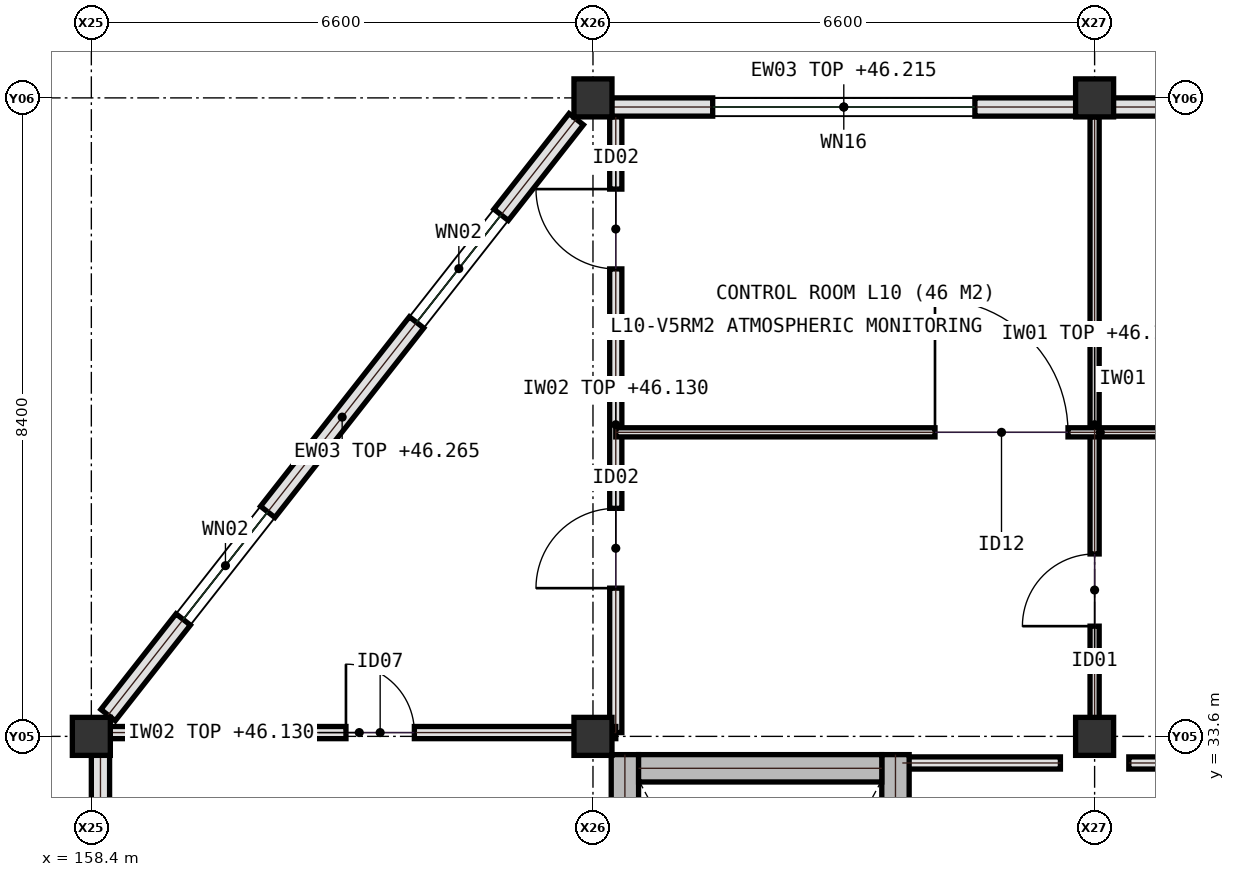
"""IFC4 building model, lengths in metres.
Left out: names, types, materials, properties, quantities, classifications, styles, units other than length and angle.
Written with IfcOpenShell. Run it as: python <this file> out.ifc"""

import sys

from ifc_helpers import new_model, si_unit, direction, frame, frame_2d, origin, origin_2d, place, context, subcontext, project, spatial, rectangle, extrude, element, fill, save


model = new_model("IFC4")
c1 = context("Model", 3, precision=1e-05, world=origin(), true_north=direction((0.0, 1.0)))
c2 = subcontext(c1, "Body", "Model", "MODEL_VIEW")
j1 = project(units=[si_unit("LENGTHUNIT", "METRE"), si_unit("PLANEANGLEUNIT", "RADIAN")], contexts=[c1])
p1 = place(None, origin())
s1 = spatial("IfcSite", under=j1, at=p1, CompositionType="ELEMENT")
p2 = place(p1, origin())
s2 = spatial("IfcBuilding", under=s1, at=p2, CompositionType="ELEMENT")
p3 = place(p2, frame((0.0, 0.0, 43.2)))
s3 = spatial("IfcBuildingStorey", under=s2, at=p3, CompositionType="ELEMENT", Elevation=43.2)
for number, where, z_axis, x_axis in (
    (1, (158.4, 33.6, 0.0), (0.0, 0.0, 1.0), (1.0, 0.0, 0.0)),
    (2, (165.0, 33.6, 0.0), (0.0, 0.0, 1.0), (1.0, 0.0, 0.0)),
    (3, (165.0, 42.0, 0.0), (0.0, 0.0, 1.0), (1.0, 0.0, 0.0)),
    (4, (171.6, 33.6, 0.0), (0.0, 0.0, 1.0), (1.0, 0.0, 0.0)),
    (5, (171.6, 42.0, 0.0), (0.0, 0.0, 1.0), (1.0, 0.0, 0.0)),
):
    element("IfcColumn", number, at=place(p3, frame(where, z_axis=z_axis, x_axis=x_axis)), inside=s3, PredefinedType="COLUMN", context=c2, shape_type="SweptSolid", body=[
        extrude(rectangle(XDim=0.5, YDim=0.5, at=origin_2d()), origin(), (0.0, 0.0, 1.0), 3.9),
    ])
p4 = place(p3, frame((165.3, 33.65, 0.0), z_axis=(0.0, 0.0, 1.0), x_axis=(0.0, 1.0, 0.0)))
e6 = element("IfcWall", 6, at=p4, inside=s3, PredefinedType="PARTITIONING", context=c2, shape_type="SweptSolid", body=[
    extrude(rectangle(XDim=8.1, YDim=0.16, at=frame_2d((4.05, 0.0))), origin(), (0.0, 0.0, 1.0), 2.93),
])
p5 = place(p4, frame((1.9, 0.0, 0.0)))
e7 = element("IfcOpeningElement", 7, at=p5, cuts=e6, PredefinedType="OPENING", context=c2, shape_type="SweptSolid", body=[
    extrude(rectangle(XDim=1.05, YDim=2.15, at=frame_2d((0.525, 1.075))), frame((0.0, 0.09, 0.0), z_axis=(0.0, -1.0, 0.0), x_axis=(1.0, 0.0, 0.0)), (0.0, 0.0, 1.0), 0.18),
])
p6 = place(p4, frame((6.1, 0.0, 0.0)))
e8 = element("IfcOpeningElement", 8, at=p6, cuts=e6, PredefinedType="OPENING", context=c2, shape_type="SweptSolid", body=[
    extrude(rectangle(XDim=1.05, YDim=2.15, at=frame_2d((0.525, 1.075))), frame((0.0, 0.09, 0.0), z_axis=(0.0, -1.0, 0.0), x_axis=(1.0, 0.0, 0.0)), (0.0, 0.0, 1.0), 0.18),
])
p7 = place(p3, frame((158.55, 33.65, 0.0), z_axis=(0.0, 0.0, 1.0), x_axis=(1.0, 0.0, 0.0)))
e9 = element("IfcWall", 9, at=p7, inside=s3, PredefinedType="PARTITIONING", context=c2, shape_type="SweptSolid", body=[
    extrude(rectangle(XDim=6.75, YDim=0.16, at=frame_2d((3.375, 0.0))), origin(), (0.0, 0.0, 1.0), 2.93),
])
p8 = place(p7, frame((3.2, 0.0, 0.0)))
e10 = element("IfcOpeningElement", 10, at=p8, cuts=e9, PredefinedType="OPENING", context=c2, shape_type="SweptSolid", body=[
    extrude(rectangle(XDim=0.9, YDim=2.1, at=frame_2d((0.45, 1.05))), frame((0.0, 0.09, 0.0), z_axis=(0.0, -1.0, 0.0), x_axis=(1.0, 0.0, 0.0)), (0.0, 0.0, 1.0), 0.18),
])
p9 = place(p3, frame((171.6, 33.65, 0.0), z_axis=(0.0, 0.0, 1.0), x_axis=(0.0, 1.0, 0.0)))
e11 = element("IfcWall", 11, at=p9, inside=s3, PredefinedType="PARTITIONING", context=c2, shape_type="SweptSolid", body=[
    extrude(rectangle(XDim=8.1, YDim=0.12, at=frame_2d((4.05, 0.0))), origin(), (0.0, 0.0, 1.0), 2.93),
])
p10 = place(p9, frame((1.4, 0.0, 0.0)))
e12 = element("IfcOpeningElement", 12, at=p10, cuts=e11, PredefinedType="OPENING", context=c2, shape_type="SweptSolid", body=[
    extrude(rectangle(XDim=0.95, YDim=2.15, at=frame_2d((0.475, 1.075))), frame((0.0, 0.07, 0.0), z_axis=(0.0, -1.0, 0.0), x_axis=(1.0, 0.0, 0.0)), (0.0, 0.0, 1.0), 0.14),
])
p11 = place(p3, frame((165.3, 37.6, 0.0), z_axis=(0.0, 0.0, 1.0), x_axis=(1.0, 0.0, 0.0)))
e13 = element("IfcWall", 13, at=p11, inside=s3, PredefinedType="PARTITIONING", context=c2, shape_type="SweptSolid", body=[
    extrude(rectangle(XDim=12.75, YDim=0.12, at=frame_2d((6.375, 0.0))), origin(), (0.0, 0.0, 1.0), 2.93),
])
p12 = place(p11, frame((4.2, 0.0, 0.0)))
e14 = element("IfcOpeningElement", 14, at=p12, cuts=e13, PredefinedType="OPENING", context=c2, shape_type="SweptSolid", body=[
    extrude(rectangle(XDim=1.75, YDim=2.3, at=frame_2d((0.875, 1.15))), frame((0.0, 0.07, 0.0), z_axis=(0.0, -1.0, 0.0), x_axis=(1.0, 0.0, 0.0)), (0.0, 0.0, 1.0), 0.14),
])
p13 = place(p11, frame((9.2, 0.0, 0.0)))
e15 = element("IfcOpeningElement", 15, at=p13, cuts=e13, PredefinedType="OPENING", context=c2, shape_type="SweptSolid", body=[
    extrude(rectangle(XDim=1.75, YDim=2.3, at=frame_2d((0.875, 1.15))), frame((0.0, 0.07, 0.0), z_axis=(0.0, -1.0, 0.0), x_axis=(1.0, 0.0, 0.0)), (0.0, 0.0, 1.0), 0.14),
])
p14 = place(p3, frame((169.07, 33.25, 0.0), z_axis=(0.0, 0.0, 1.0), x_axis=(1.0, 0.0, 0.0)))
e16 = element("IfcWall", 16, at=p14, inside=s3, PredefinedType="PARTITIONING", context=c2, shape_type="SweptSolid", body=[
    extrude(rectangle(XDim=2.08, YDim=0.16, at=frame_2d((1.04, 0.0))), origin(), (0.0, 0.0, 1.0), 2.93),
])
p15 = place(p3, frame((172.05, 33.25, 0.0), z_axis=(0.0, 0.0, 1.0), x_axis=(1.0, 0.0, 0.0)))
e17 = element("IfcWall", 17, at=p15, inside=s3, PredefinedType="PARTITIONING", context=c2, shape_type="SweptSolid", body=[
    extrude(rectangle(XDim=5.95, YDim=0.16, at=frame_2d((2.975, 0.0))), origin(), (0.0, 0.0, 1.0), 2.93),
])
p16 = place(p3, frame((158.52, 33.355, 0.0), z_axis=(0.0, 0.0, 1.0), x_axis=(0.0, -1.0, 0.0)))
e18 = element("IfcWall", 18, at=p16, inside=s3, PredefinedType="SOLIDWALL", context=c2, shape_type="SweptSolid", body=[
    extrude(rectangle(XDim=7.91, YDim=0.24, at=frame_2d((3.955, 0.0))), origin(), (0.0, 0.0, 1.0), 3.115),
])
p17 = place(p16, frame((3.305, 0.0, 0.95)))
e19 = element("IfcOpeningElement", 19, at=p17, cuts=e18, PredefinedType="OPENING", context=c2, shape_type="SweptSolid", body=[
    extrude(rectangle(XDim=1.3, YDim=1.75, at=frame_2d((0.65, 0.875))), frame((0.0, 0.13, 0.0), z_axis=(0.0, -1.0, 0.0), x_axis=(1.0, 0.0, 0.0)), (0.0, 0.0, 1.0), 0.26),
])
p18 = place(p3, frame((171.355, 41.88, 0.0), z_axis=(0.0, 0.0, 1.0), x_axis=(-1.0, 0.0, 0.0)))
e20 = element("IfcWall", 20, at=p18, inside=s3, PredefinedType="SOLIDWALL", context=c2, shape_type="SweptSolid", body=[
    extrude(rectangle(XDim=6.11, YDim=0.24, at=frame_2d((3.055, 0.0))), origin(), (0.0, 0.0, 1.0), 3.015),
])
p19 = place(p18, frame((1.33, 0.0, 0.95)))
e21 = element("IfcOpeningElement", 21, at=p19, cuts=e20, PredefinedType="OPENING", context=c2, shape_type="SweptSolid", body=[
    extrude(rectangle(XDim=3.45, YDim=1.7, at=frame_2d((1.725, 0.85))), frame((0.0, 0.13, 0.0), z_axis=(0.0, -1.0, 0.0), x_axis=(1.0, 0.0, 0.0)), (0.0, 0.0, 1.0), 0.26),
])
p20 = place(p3, frame((177.955, 41.88, 0.0), z_axis=(0.0, 0.0, 1.0), x_axis=(-1.0, 0.0, 0.0)))
e22 = element("IfcWall", 22, at=p20, inside=s3, PredefinedType="SOLIDWALL", context=c2, shape_type="SweptSolid", body=[
    extrude(rectangle(XDim=6.11, YDim=0.24, at=frame_2d((3.055, 0.0))), origin(), (0.0, 0.0, 1.0), 3.015),
])
p21 = place(p20, frame((2.605, 0.0, 0.95)))
e23 = element("IfcOpeningElement", 23, at=p21, cuts=e22, PredefinedType="OPENING", context=c2, shape_type="SweptSolid", body=[
    extrude(rectangle(XDim=0.9, YDim=1.4, at=frame_2d((0.45, 0.7))), frame((0.0, 0.13, 0.0), z_axis=(0.0, -1.0, 0.0), x_axis=(1.0, 0.0, 0.0)), (0.0, 0.0, 1.0), 0.26),
])
p22 = place(p3, frame((158.62, 33.88, 0.0), z_axis=(0.0, 0.0, 1.0), x_axis=(0.617811819191, 0.786325985878, 0.0)))
e24 = element("IfcWall", 24, at=p22, inside=s3, PredefinedType="SOLIDWALL", context=c2, shape_type="SweptSolid", body=[
    extrude(rectangle(XDim=9.97, YDim=0.24, at=frame_2d((4.985, 0.0))), origin(), (0.0, 0.0, 1.0), 3.065),
])
p23 = place(p22, frame((1.6, 0.0, 0.95)))
e25 = element("IfcOpeningElement", 25, at=p23, cuts=e24, PredefinedType="OPENING", context=c2, shape_type="SweptSolid", body=[
    extrude(rectangle(XDim=1.8, YDim=1.6, at=frame_2d((0.9, 0.8))), frame((0.0, 0.13, 0.0), z_axis=(0.0, -1.0, 0.0), x_axis=(1.0, 0.0, 0.0)), (0.0, 0.0, 1.0), 0.26),
])
p24 = place(p22, frame((6.57, 0.0, 0.95)))
e26 = element("IfcOpeningElement", 26, at=p24, cuts=e24, PredefinedType="OPENING", context=c2, shape_type="SweptSolid", body=[
    extrude(rectangle(XDim=1.8, YDim=1.6, at=frame_2d((0.9, 0.8))), frame((0.0, 0.13, 0.0), z_axis=(0.0, -1.0, 0.0), x_axis=(1.0, 0.0, 0.0)), (0.0, 0.0, 1.0), 0.26),
])
p25 = place(p3, frame((165.42, 25.19, 0.0), z_axis=(0.0, 0.0, 1.0), x_axis=(0.0, 1.0, 0.0)))
e27 = element("IfcWall", 27, at=p25, inside=s3, PredefinedType="SHEAR", context=c2, shape_type="SweptSolid", body=[
    extrude(rectangle(XDim=8.17, YDim=0.36, at=frame_2d((4.085, 0.0))), origin(), (0.0, 0.0, 1.0), 3.68),
])
p26 = place(p3, frame((168.98, 25.19, 0.0), z_axis=(0.0, 0.0, 1.0), x_axis=(0.0, 1.0, 0.0)))
e28 = element("IfcWall", 28, at=p26, inside=s3, PredefinedType="SHEAR", context=c2, shape_type="SweptSolid", body=[
    extrude(rectangle(XDim=8.17, YDim=0.36, at=frame_2d((4.085, 0.0))), origin(), (0.0, 0.0, 1.0), 3.68),
])
p27 = place(p26, frame((0.45, 0.0, 0.0)))
e29 = element("IfcOpeningElement", 29, at=p27, cuts=e28, PredefinedType="OPENING", context=c2, shape_type="SweptSolid", body=[
    extrude(rectangle(XDim=1.25, YDim=2.15, at=frame_2d((0.625, 1.075))), frame((0.0, 0.19, 0.0), z_axis=(0.0, -1.0, 0.0), x_axis=(1.0, 0.0, 0.0)), (0.0, 0.0, 1.0), 0.38),
])
p28 = place(p3, frame((165.6, 33.18, 0.0), z_axis=(0.0, 0.0, 1.0), x_axis=(1.0, 0.0, 0.0)))
e30 = element("IfcWall", 30, at=p28, inside=s3, PredefinedType="SHEAR", context=c2, shape_type="SweptSolid", body=[
    extrude(rectangle(XDim=3.2, YDim=0.36, at=frame_2d((1.6, 0.0))), origin(), (0.0, 0.0, 1.0), 3.68),
])
p29 = place(p5, origin())
e31 = element("IfcDoor", 31, at=p29, inside=s3, OperationType="SINGLE_SWING_LEFT", PredefinedType="DOOR", context=c2, shape_type="SweptSolid", body=[
    extrude(rectangle(XDim=1.05, YDim=2.15, at=frame_2d((0.525, 1.075))), frame((0.0, 0.025, 0.0), z_axis=(0.0, -1.0, 0.0), x_axis=(1.0, 0.0, 0.0)), (0.0, 0.0, 1.0), 0.05),
])
fill(e7, e31)
p30 = place(p6, origin())
e32 = element("IfcDoor", 32, at=p30, inside=s3, OperationType="SINGLE_SWING_RIGHT", PredefinedType="DOOR", context=c2, shape_type="SweptSolid", body=[
    extrude(rectangle(XDim=1.05, YDim=2.15, at=frame_2d((0.525, 1.075))), frame((0.0, 0.025, 0.0), z_axis=(0.0, -1.0, 0.0), x_axis=(1.0, 0.0, 0.0)), (0.0, 0.0, 1.0), 0.05),
])
fill(e8, e32)
p31 = place(p8, origin())
e33 = element("IfcDoor", 33, at=p31, inside=s3, OperationType="SINGLE_SWING_LEFT", PredefinedType="DOOR", context=c2, shape_type="SweptSolid", body=[
    extrude(rectangle(XDim=0.9, YDim=2.1, at=frame_2d((0.45, 1.05))), frame((0.0, 0.025, 0.0), z_axis=(0.0, -1.0, 0.0), x_axis=(1.0, 0.0, 0.0)), (0.0, 0.0, 1.0), 0.05),
])
fill(e10, e33)
p32 = place(p10, origin())
e34 = element("IfcDoor", 34, at=p32, inside=s3, OperationType="SINGLE_SWING_LEFT", PredefinedType="DOOR", context=c2, shape_type="SweptSolid", body=[
    extrude(rectangle(XDim=0.95, YDim=2.15, at=frame_2d((0.475, 1.075))), frame((0.0, 0.025, 0.0), z_axis=(0.0, -1.0, 0.0), x_axis=(1.0, 0.0, 0.0)), (0.0, 0.0, 1.0), 0.05),
])
fill(e12, e34)
p33 = place(p12, origin())
e35 = element("IfcDoor", 35, at=p33, inside=s3, OperationType="SINGLE_SWING_LEFT", PredefinedType="DOOR", context=c2, shape_type="SweptSolid", body=[
    extrude(rectangle(XDim=1.75, YDim=2.3, at=frame_2d((0.875, 1.15))), frame((0.0, 0.025, 0.0), z_axis=(0.0, -1.0, 0.0), x_axis=(1.0, 0.0, 0.0)), (0.0, 0.0, 1.0), 0.05),
])
fill(e14, e35)
p34 = place(p19, origin())
e36 = element("IfcWindow", 36, at=p34, inside=s3, PartitioningType="SINGLE_PANEL", PredefinedType="WINDOW", context=c2, shape_type="SweptSolid", body=[
    extrude(rectangle(XDim=3.45, YDim=1.7, at=frame_2d((1.725, 0.85))), frame((0.0, 0.03, 0.0), z_axis=(0.0, -1.0, 0.0), x_axis=(1.0, 0.0, 0.0)), (0.0, 0.0, 1.0), 0.06),
])
fill(e21, e36)
p35 = place(p23, origin())
e37 = element("IfcWindow", 37, at=p35, inside=s3, PartitioningType="SINGLE_PANEL", PredefinedType="WINDOW", context=c2, shape_type="SweptSolid", body=[
    extrude(rectangle(XDim=1.8, YDim=1.6, at=frame_2d((0.9, 0.8))), frame((0.0, 0.03, 0.0), z_axis=(0.0, -1.0, 0.0), x_axis=(1.0, 0.0, 0.0)), (0.0, 0.0, 1.0), 0.06),
])
fill(e25, e37)
p36 = place(p24, origin())
e38 = element("IfcWindow", 38, at=p36, inside=s3, PartitioningType="SINGLE_PANEL", PredefinedType="WINDOW", context=c2, shape_type="SweptSolid", body=[
    extrude(rectangle(XDim=1.8, YDim=1.6, at=frame_2d((0.9, 0.8))), frame((0.0, 0.03, 0.0), z_axis=(0.0, -1.0, 0.0), x_axis=(1.0, 0.0, 0.0)), (0.0, 0.0, 1.0), 0.06),
])
fill(e26, e38)
save(model, sys.argv[1])
